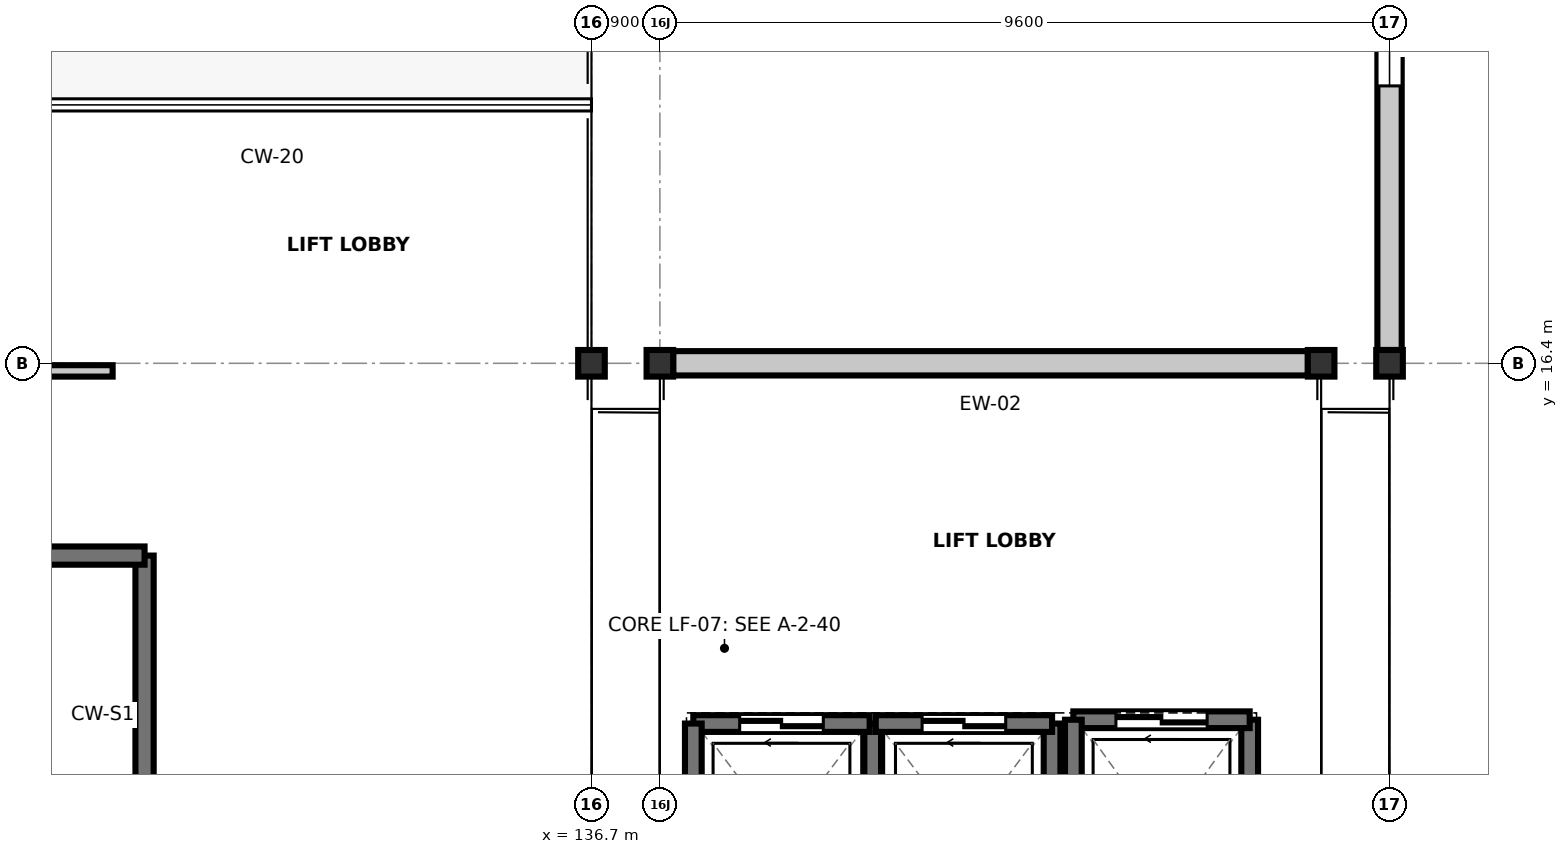
"""IFC4 building model, lengths in metres.
Left out: names, types, materials, properties, quantities, classifications, styles, units other than length and angle.
Written with IfcOpenShell. Run it as: python <this file> out.ifc"""

import sys

from ifc_helpers import new_model, si_unit, direction, frame, frame_2d, origin, origin_2d, place, context, subcontext, project, spatial, rectangle, i_section, extrude, element, fill, save


model = new_model("IFC4")
c1 = context("Model", 3, precision=1e-05, world=origin(), true_north=direction((0.0, 1.0)))
c2 = subcontext(c1, "Body", "Model", "MODEL_VIEW")
j1 = project(units=[si_unit("LENGTHUNIT", "METRE"), si_unit("PLANEANGLEUNIT", "RADIAN")], contexts=[c1])
p1 = place(None, origin())
s1 = spatial("IfcSite", under=j1, at=p1, CompositionType="ELEMENT")
p2 = place(p1, origin())
s2 = spatial("IfcBuilding", under=s1, at=p2, CompositionType="ELEMENT")
p3 = place(p2, frame((0.0, 0.0, 19.2)))
s3 = spatial("IfcBuildingStorey", under=s2, at=p3, CompositionType="ELEMENT", Elevation=19.2)
for number, where, z_axis, x_axis in (
    (1, (136.7, 16.4, 0.0), (0.0, 0.0, 1.0), (1.0, 0.0, 0.0)),
    (2, (137.6, 16.4, 0.0), (0.0, 0.0, 1.0), (1.0, 0.0, 0.0)),
    (3, (146.3, 16.4, 0.0), (0.0, 0.0, 1.0), (1.0, 0.0, 0.0)),
    (4, (147.2, 16.4, 0.0), (0.0, 0.0, 1.0), (1.0, 0.0, 0.0)),
):
    element("IfcColumn", number, at=place(p3, frame(where, z_axis=z_axis, x_axis=x_axis)), inside=s3, PredefinedType="COLUMN", context=c2, shape_type="SweptSolid", body=[
        extrude(i_section(OverallWidth=0.35, OverallDepth=0.35, WebThickness=0.012, FlangeThickness=0.019, FilletRadius=0.02, at=origin_2d()), origin(), (0.0, 0.0, 1.0), 5.4),
    ])
p4 = place(p3, frame((146.125, 16.4, 0.0), z_axis=(0.0, 0.0, 1.0), x_axis=(-1.0, 0.0, 0.0)))
e5 = element("IfcWall", 5, at=p4, inside=s3, PredefinedType="STANDARD", context=c2, shape_type="SweptSolid", body=[
    extrude(rectangle(XDim=8.35, YDim=0.32, at=frame_2d((4.175, 0.0))), origin(), (0.0, 0.0, 1.0), 4.195),
])
p5 = place(p3, frame((147.2, 24.625, 0.0), z_axis=(0.0, 0.0, 1.0), x_axis=(0.0, -1.0, 0.0)))
e6 = element("IfcWall", 6, at=p5, inside=s3, PredefinedType="STANDARD", context=c2, shape_type="SweptSolid", body=[
    extrude(rectangle(XDim=8.05, YDim=0.32, at=frame_2d((4.025, 0.0))), origin(), (0.0, 0.0, 1.0), 4.657),
])
p6 = place(p5, frame((3.475, 0.0, 0.95)))
e7 = element("IfcOpeningElement", 7, at=p6, cuts=e6, PredefinedType="OPENING", context=c2, shape_type="SweptSolid", body=[
    extrude(rectangle(XDim=1.1, YDim=1.95, at=frame_2d((0.55, 0.975))), frame((0.0, 0.17, 0.0), z_axis=(0.0, -1.0, 0.0), x_axis=(1.0, 0.0, 0.0)), (0.0, 0.0, 1.0), 0.34),
])
p7 = place(p3, frame((130.82, 9.68, 0.0), z_axis=(0.0, 0.0, 1.0), x_axis=(0.0, 1.0, 0.0)))
e8 = element("IfcWall", 8, at=p7, inside=s3, PredefinedType="SHEAR", context=c2, shape_type="SweptSolid", body=[
    extrude(rectangle(XDim=4.19, YDim=0.24, at=frame_2d((2.095, 0.0))), origin(), (0.0, 0.0, 1.0), 5.16),
])
p8 = place(p3, frame((130.82, 13.87, 0.0), z_axis=(0.0, 0.0, 1.0), x_axis=(-1.0, 0.0, 0.0)))
e9 = element("IfcWall", 9, at=p8, inside=s3, PredefinedType="SHEAR", context=c2, shape_type="SweptSolid", body=[
    extrude(rectangle(XDim=8.54, YDim=0.24, at=frame_2d((4.27, 0.0))), origin(), (0.0, 0.0, 1.0), 5.16),
])
p9 = place(p3, frame((140.4, 8.74, 0.0), z_axis=(0.0, 0.0, 1.0), x_axis=(0.0, 1.0, 0.0)))
e10 = element("IfcWall", 10, at=p9, inside=s3, PredefinedType="SHEAR", context=c2, shape_type="SweptSolid", body=[
    extrude(rectangle(XDim=2.92, YDim=0.22, at=frame_2d((1.46, 0.0))), origin(), (0.0, 0.0, 1.0), 5.16),
])
p10 = place(p3, frame((140.36, 11.66, 0.0), z_axis=(0.0, 0.0, 1.0), x_axis=(-1.0, 0.0, 0.0)))
e11 = element("IfcWall", 11, at=p10, inside=s3, PredefinedType="SHEAR", context=c2, shape_type="SweptSolid", body=[
    extrude(rectangle(XDim=2.32, YDim=0.22, at=frame_2d((1.16, 0.0))), origin(), (0.0, 0.0, 1.0), 5.16),
])
p11 = place(p10, frame((0.61, 0.0, 0.0)))
e12 = element("IfcOpeningElement", 12, at=p11, cuts=e11, PredefinedType="OPENING", context=c2, shape_type="SweptSolid", body=[
    extrude(rectangle(XDim=1.1, YDim=2.15, at=frame_2d((0.55, 1.075))), frame((0.0, 0.12, 0.0), z_axis=(0.0, -1.0, 0.0), x_axis=(1.0, 0.0, 0.0)), (0.0, 0.0, 1.0), 0.24),
])
for number, where, z_axis, x_axis in (
    (13, (138.04, 11.66, 0.0), (0.0, 0.0, 1.0), (0.0, -1.0, 0.0)),
    (14, (142.76, 8.74, 0.0), (0.0, 0.0, 1.0), (0.0, 1.0, 0.0)),
):
    element("IfcWall", number, at=place(p3, frame(where, z_axis=z_axis, x_axis=x_axis)), inside=s3, PredefinedType="SHEAR", context=c2, shape_type="SweptSolid", body=[
        extrude(rectangle(XDim=2.92, YDim=0.22, at=frame_2d((1.46, 0.0))), origin(), (0.0, 0.0, 1.0), 5.16),
    ])
p12 = place(p3, frame((142.76, 11.66, 0.0), z_axis=(0.0, 0.0, 1.0), x_axis=(-1.0, 0.0, 0.0)))
e15 = element("IfcWall", 15, at=p12, inside=s3, PredefinedType="SHEAR", context=c2, shape_type="SweptSolid", body=[
    extrude(rectangle(XDim=2.32, YDim=0.22, at=frame_2d((1.16, 0.0))), origin(), (0.0, 0.0, 1.0), 5.16),
])
p13 = place(p12, frame((0.61, 0.0, 0.0)))
e16 = element("IfcOpeningElement", 16, at=p13, cuts=e15, PredefinedType="OPENING", context=c2, shape_type="SweptSolid", body=[
    extrude(rectangle(XDim=1.1, YDim=2.15, at=frame_2d((0.55, 1.075))), frame((0.0, 0.12, 0.0), z_axis=(0.0, -1.0, 0.0), x_axis=(1.0, 0.0, 0.0)), (0.0, 0.0, 1.0), 0.24),
])
p14 = place(p3, frame((145.36, 8.69, 0.0), z_axis=(0.0, 0.0, 1.0), x_axis=(0.0, 1.0, 0.0)))
e17 = element("IfcWall", 17, at=p14, inside=s3, PredefinedType="SHEAR", context=c2, shape_type="SweptSolid", body=[
    extrude(rectangle(XDim=3.02, YDim=0.22, at=frame_2d((1.51, 0.0))), origin(), (0.0, 0.0, 1.0), 5.16),
])
p15 = place(p3, frame((145.36, 11.71, 0.0), z_axis=(0.0, 0.0, 1.0), x_axis=(-1.0, 0.0, 0.0)))
e18 = element("IfcWall", 18, at=p15, inside=s3, PredefinedType="SHEAR", context=c2, shape_type="SweptSolid", body=[
    extrude(rectangle(XDim=2.32, YDim=0.22, at=frame_2d((1.16, 0.0))), origin(), (0.0, 0.0, 1.0), 5.16),
])
p16 = place(p15, frame((0.56, 0.0, 0.0)))
e19 = element("IfcOpeningElement", 19, at=p16, cuts=e18, PredefinedType="OPENING", context=c2, shape_type="SweptSolid", body=[
    extrude(rectangle(XDim=1.2, YDim=2.15, at=frame_2d((0.6, 1.075))), frame((0.0, 0.12, 0.0), z_axis=(0.0, -1.0, 0.0), x_axis=(1.0, 0.0, 0.0)), (0.0, 0.0, 1.0), 0.24),
])
p17 = place(p3, frame((143.04, 11.71, 0.0), z_axis=(0.0, 0.0, 1.0), x_axis=(0.0, -1.0, 0.0)))
e20 = element("IfcWall", 20, at=p17, inside=s3, PredefinedType="SHEAR", context=c2, shape_type="SweptSolid", body=[
    extrude(rectangle(XDim=3.02, YDim=0.22, at=frame_2d((1.51, 0.0))), origin(), (0.0, 0.0, 1.0), 5.16),
])
p18 = place(p3, frame((120.2, 16.3, 0.0), z_axis=(0.0, 0.0, 1.0), x_axis=(1.0, 0.0, 0.0)))
e21 = element("IfcWall", 21, at=p18, inside=s3, PredefinedType="PARTITIONING", context=c2, shape_type="SweptSolid", body=[
    extrude(rectangle(XDim=10.2, YDim=0.15, at=frame_2d((5.1, 0.0))), origin(), (0.0, 0.0, 1.0), 4.145),
])
p19 = place(p18, frame((3.35, 0.0, 0.0)))
e22 = element("IfcOpeningElement", 22, at=p19, cuts=e21, PredefinedType="OPENING", context=c2, shape_type="SweptSolid", body=[
    extrude(rectangle(XDim=1.3, YDim=2.18, at=frame_2d((0.65, 1.09))), frame((0.0, 0.085, 0.0), z_axis=(0.0, -1.0, 0.0), x_axis=(1.0, 0.0, 0.0)), (0.0, 0.0, 1.0), 0.17),
])
p20 = place(p6, origin())
e23 = element("IfcWindow", 23, at=p20, inside=s3, PartitioningType="SINGLE_PANEL", PredefinedType="WINDOW", context=c2, shape_type="SweptSolid", body=[
    extrude(rectangle(XDim=1.1, YDim=1.95, at=frame_2d((0.55, 0.975))), frame((0.0, 0.03, 0.0), z_axis=(0.0, -1.0, 0.0), x_axis=(1.0, 0.0, 0.0)), (0.0, 0.0, 1.0), 0.06),
])
fill(e7, e23)
p21 = place(p11, origin())
e24 = element("IfcDoor", 24, at=p21, inside=s3, OperationType="DOUBLE_DOOR_SLIDING", PredefinedType="DOOR", context=c2, shape_type="SweptSolid", body=[
    extrude(rectangle(XDim=1.1, YDim=2.15, at=frame_2d((0.55, 1.075))), frame((0.0, 0.025, 0.0), z_axis=(0.0, -1.0, 0.0), x_axis=(1.0, 0.0, 0.0)), (0.0, 0.0, 1.0), 0.05),
])
fill(e12, e24)
p22 = place(p13, origin())
e25 = element("IfcDoor", 25, at=p22, inside=s3, OperationType="DOUBLE_DOOR_SLIDING", PredefinedType="DOOR", context=c2, shape_type="SweptSolid", body=[
    extrude(rectangle(XDim=1.1, YDim=2.15, at=frame_2d((0.55, 1.075))), frame((0.0, 0.025, 0.0), z_axis=(0.0, -1.0, 0.0), x_axis=(1.0, 0.0, 0.0)), (0.0, 0.0, 1.0), 0.05),
])
fill(e16, e25)
p23 = place(p16, origin())
e26 = element("IfcDoor", 26, at=p23, inside=s3, OperationType="DOUBLE_DOOR_SLIDING", PredefinedType="DOOR", context=c2, shape_type="SweptSolid", body=[
    extrude(rectangle(XDim=1.2, YDim=2.15, at=frame_2d((0.6, 1.075))), frame((0.0, 0.025, 0.0), z_axis=(0.0, -1.0, 0.0), x_axis=(1.0, 0.0, 0.0)), (0.0, 0.0, 1.0), 0.05),
])
fill(e19, e26)
save(model, sys.argv[1])
